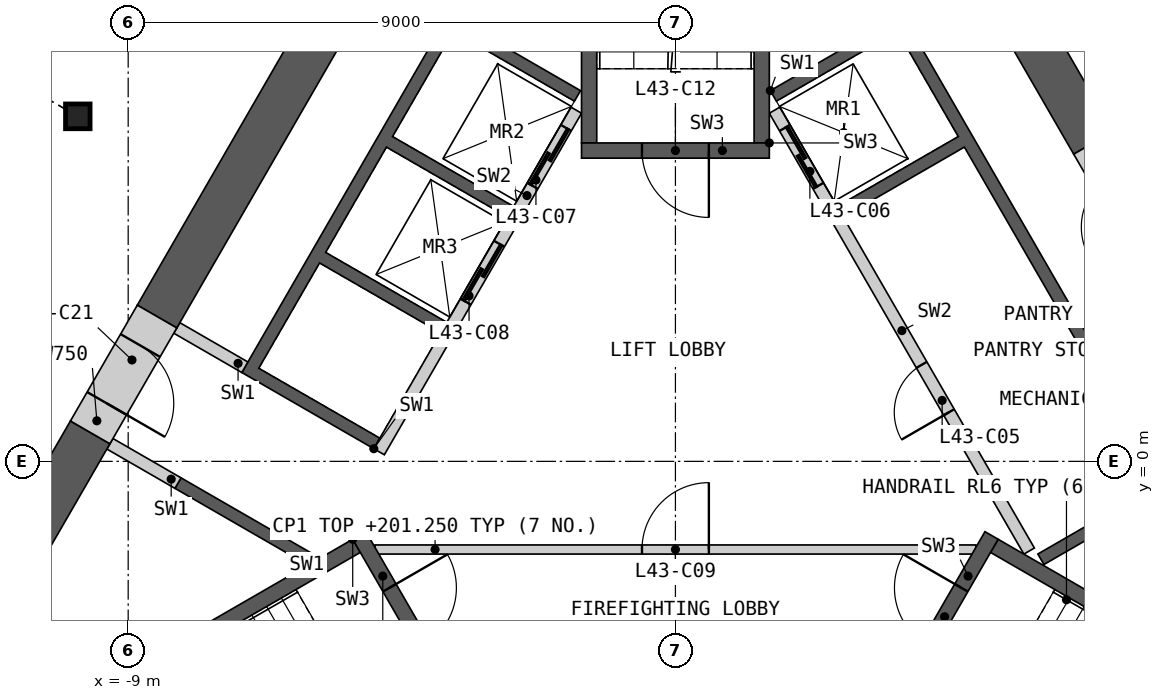
"""IFC4 building model, lengths in metres.
Left out: names, types, materials, properties, quantities, classifications, styles, units other than length and angle.
Written with IfcOpenShell. Run it as: python <this file> out.ifc"""

import sys

from ifc_helpers import new_model, si_unit, direction, frame, frame_2d, origin, origin_2d, place, context, subcontext, project, spatial, polyline, rectangle, i_section, outline, extrude, element, fill, save


model = new_model("IFC4")
c1 = context("Model", 3, precision=1e-05, world=origin(), true_north=direction((0.0, 1.0)))
c2 = subcontext(c1, "Body", "Model", "MODEL_VIEW")
j1 = project(units=[si_unit("LENGTHUNIT", "METRE"), si_unit("PLANEANGLEUNIT", "RADIAN")], contexts=[c1])
p1 = place(None, origin())
s1 = spatial("IfcSite", under=j1, at=p1, CompositionType="ELEMENT")
p2 = place(p1, origin())
s2 = spatial("IfcBuilding", under=s1, at=p2, CompositionType="ELEMENT")
p3 = place(p2, frame((0.0, 0.0, 198.0)))
s3 = spatial("IfcBuildingStorey", under=s2, at=p3, CompositionType="ELEMENT", Elevation=198.0)
p4 = place(p3, frame((-9.828, 5.675, 0.0), z_axis=(0.0, 0.0, 1.0), x_axis=(1.0, 0.0, 0.0)))
e1 = element("IfcColumn", 1, at=p4, inside=s3, PredefinedType="COLUMN", context=c2, shape_type="SweptSolid", body=[
    extrude(i_section(OverallWidth=0.404, OverallDepth=0.407, WebThickness=0.027, FlangeThickness=0.044, at=origin_2d()), origin(), (0.0, 0.0, 1.0), 3.6),
])
p5 = place(p3, origin())
e2 = element("IfcWall", 2, at=p5, inside=s3, PredefinedType="SHEAR", context=c2, shape_type="SweptSolid", body=[
    extrude(outline(polyline([(1.561, 6.097), (3.731, 7.35), (8.231, -0.444), (6.061, -1.697), (5.96, -1.524), (7.952, -0.374), (4.752, 5.169), (2.76, 4.019), (2.66, 4.192), (4.652, 5.342), (3.652, 7.074), (1.66, 5.924), (1.561, 6.097)])), origin(), (0.0, 0.0, 1.0), 3.25),
])
p6 = place(p3, frame((5.817, -1.476, 0.0), z_axis=(0.0, 0.0, 1.0), x_axis=(-0.500002616675, 0.866023893041, 0.0)))
e3 = element("IfcWall", 3, at=p6, inside=s3, PredefinedType="SOLIDWALL", context=c2, shape_type="SweptSolid", body=[
    extrude(rectangle(XDim=8.373, YDim=0.2, at=frame_2d((4.187, 0.0))), origin(), (0.0, 0.0, 1.0), 3.25),
])
p7 = place(p6, frame((2.637, 0.0, 0.0)))
e4 = element("IfcOpeningElement", 4, at=p7, cuts=e3, PredefinedType="OPENING", context=c2, shape_type="SweptSolid", body=[
    extrude(rectangle(XDim=0.9, YDim=2.1, at=frame_2d((0.45, 1.05))), frame((0.0, 0.11, 0.0), z_axis=(0.0, -1.0, 0.0), x_axis=(1.0, 0.0, 0.0)), (0.0, 0.0, 1.0), 0.22),
])
p8 = place(p6, frame((6.937, 0.0, 0.0)))
e5 = element("IfcOpeningElement", 5, at=p8, cuts=e3, PredefinedType="OPENING", context=c2, shape_type="SweptSolid", body=[
    extrude(rectangle(XDim=1.1, YDim=2.1, at=frame_2d((0.55, 1.05))), frame((0.0, 0.11, 0.0), z_axis=(0.0, -1.0, 0.0), x_axis=(1.0, 0.0, 0.0)), (0.0, 0.0, 1.0), 0.22),
])
p9 = place(p3, origin())
e6 = element("IfcWall", 6, at=p9, inside=s3, PredefinedType="SHEAR", context=c2, shape_type="SweptSolid", body=[
    extrude(outline(polyline([(-6.061, -1.697), (-8.231, -0.444), (-8.131, -0.271), (-5.96, -1.524), (-6.061, -1.697)])), origin(), (0.0, 0.0, 1.0), 3.25),
])
p10 = place(p3, origin())
e7 = element("IfcWall", 7, at=p10, inside=s3, PredefinedType="SHEAR", context=c2, shape_type="SweptSolid", body=[
    extrude(outline(polyline([(-4.96, 0.208), (-7.131, 1.461), (-3.731, 7.35), (-1.561, 6.097), (-1.66, 5.924), (-3.652, 7.074), (-4.652, 5.342), (-2.66, 4.192), (-2.76, 4.019), (-4.752, 5.169), (-5.752, 3.437), (-3.76, 2.287), (-3.861, 2.113), (-5.852, 3.263), (-6.852, 1.531), (-4.861, 0.381), (-4.96, 0.208)])), origin(), (0.0, 0.0, 1.0), 3.25),
])
p11 = place(p3, frame((-1.631, 5.776, 0.0), z_axis=(0.0, 0.0, 1.0), x_axis=(-0.499992876559, -0.866029516466, 0.0)))
e8 = element("IfcWall", 8, at=p11, inside=s3, PredefinedType="SOLIDWALL", context=c2, shape_type="SweptSolid", body=[
    extrude(rectangle(XDim=6.486, YDim=0.2, at=frame_2d((3.243, 0.0))), origin(), (0.0, 0.0, 1.0), 3.25),
])
p12 = place(p11, frame((0.337, 0.0, 0.0)))
e9 = element("IfcOpeningElement", 9, at=p12, cuts=e8, PredefinedType="OPENING", context=c2, shape_type="SweptSolid", body=[
    extrude(rectangle(XDim=1.1, YDim=2.1, at=frame_2d((0.55, 1.05))), frame((0.0, 0.11, 0.0), z_axis=(0.0, -1.0, 0.0), x_axis=(1.0, 0.0, 0.0)), (0.0, 0.0, 1.0), 0.22),
])
p13 = place(p11, frame((2.537, 0.0, 0.0)))
e10 = element("IfcOpeningElement", 10, at=p13, cuts=e8, PredefinedType="OPENING", context=c2, shape_type="SweptSolid", body=[
    extrude(rectangle(XDim=1.1, YDim=2.1, at=frame_2d((0.55, 1.05))), frame((0.0, 0.11, 0.0), z_axis=(0.0, -1.0, 0.0), x_axis=(1.0, 0.0, 0.0)), (0.0, 0.0, 1.0), 0.22),
])
for number, where, z_axis, x_axis in (
    (11, (-7.081, 1.548, 0.0), (0.0, 0.0, 1.0), (-0.866, 0.5, 0.0)),
    (12, (-8.181, -0.357, 0.0), (0.0, 0.0, 1.0), (-0.866, 0.5, 0.0)),
):
    element("IfcWall", number, at=place(p3, frame(where, z_axis=z_axis, x_axis=x_axis)), inside=s3, PredefinedType="SHEAR", context=c2, shape_type="SweptSolid", body=[
        extrude(rectangle(XDim=1.293, YDim=0.2, at=frame_2d((0.646, 0.0))), origin(), (0.0, 0.0, 1.0), 3.25),
    ])
p14 = place(p3, frame((-4.941, -1.45, 0.0), z_axis=(0.0, 0.0, 1.0), x_axis=(1.0, 0.0, 0.0)))
e13 = element("IfcWall", 13, at=p14, inside=s3, PredefinedType="PARTITIONING", context=c2, shape_type="SweptSolid", body=[
    extrude(rectangle(XDim=9.882, YDim=0.15, at=frame_2d((4.941, 0.0))), origin(), (0.0, 0.0, 1.0), 3.25),
])
p15 = place(p14, frame((4.391, 0.0, 0.0)))
e14 = element("IfcOpeningElement", 14, at=p15, cuts=e13, PredefinedType="OPENING", context=c2, shape_type="SweptSolid", body=[
    extrude(rectangle(XDim=1.1, YDim=2.1, at=frame_2d((0.55, 1.05))), frame((0.0, 0.085, 0.0), z_axis=(0.0, -1.0, 0.0), x_axis=(1.0, 0.0, 0.0)), (0.0, 0.0, 1.0), 0.17),
])
p16 = place(p3, origin())
e15 = element("IfcWall", 15, at=p16, inside=s3, PredefinedType="SHEAR", context=c2, shape_type="SweptSolid", body=[
    extrude(outline(polyline([(-5.307, -1.281), (-10.374, -4.206), (-10.032, -4.298), (-5.182, -1.498), (-5.307, -1.281)])), origin(), (0.0, 0.0, 1.0), 3.25),
])
p17 = place(p3, frame((-5.199, -1.219, 0.0), z_axis=(0.0, 0.0, 1.0), x_axis=(0.499982516597, -0.866035497597, 0.0)))
e16 = element("IfcWall", 16, at=p17, inside=s3, PredefinedType="SHEAR", context=c2, shape_type="SweptSolid", body=[
    extrude(rectangle(XDim=3.088, YDim=0.25, at=frame_2d((1.544, 0.0))), origin(), (0.0, 0.0, 1.0), 3.25),
])
p18 = place(p17, frame((0.994, 0.0, 0.0)))
e17 = element("IfcOpeningElement", 17, at=p18, cuts=e16, PredefinedType="OPENING", context=c2, shape_type="SweptSolid", body=[
    extrude(rectangle(XDim=1.1, YDim=2.1, at=frame_2d((0.55, 1.05))), frame((0.0, 0.135, 0.0), z_axis=(0.0, -1.0, 0.0), x_axis=(1.0, 0.0, 0.0)), (0.0, 0.0, 1.0), 0.27),
])
p19 = place(p3, origin())
e18 = element("IfcWall", 18, at=p19, inside=s3, PredefinedType="SHEAR", context=c2, shape_type="SweptSolid", body=[
    extrude(outline(polyline([(10.032, -4.298), (10.374, -4.206), (5.307, -1.281), (5.182, -1.498), (10.032, -4.298)])), origin(), (0.0, 0.0, 1.0), 3.25),
])
p20 = place(p3, frame((3.655, -3.893, 0.0), z_axis=(0.0, 0.0, 1.0), x_axis=(0.499982516597, 0.866035497597, 0.0)))
e19 = element("IfcWall", 19, at=p20, inside=s3, PredefinedType="SHEAR", context=c2, shape_type="SweptSolid", body=[
    extrude(rectangle(XDim=3.088, YDim=0.25, at=frame_2d((1.544, 0.0))), origin(), (0.0, 0.0, 1.0), 3.25),
])
p21 = place(p20, frame((0.994, 0.0, 0.0)))
e20 = element("IfcOpeningElement", 20, at=p21, cuts=e19, PredefinedType="OPENING", context=c2, shape_type="SweptSolid", body=[
    extrude(rectangle(XDim=1.1, YDim=2.1, at=frame_2d((0.55, 1.05))), frame((0.0, 0.135, 0.0), z_axis=(0.0, -1.0, 0.0), x_axis=(1.0, 0.0, 0.0)), (0.0, 0.0, 1.0), 0.27),
])
p22 = place(p3, origin())
e21 = element("IfcWall", 21, at=p22, inside=s3, PredefinedType="SHEAR", context=c2, shape_type="SweptSolid", body=[
    extrude(outline(polyline([(1.544, 5.237), (1.544, 11.087), (1.294, 10.837), (1.294, 5.237), (1.544, 5.237)])), origin(), (0.0, 0.0, 1.0), 3.25),
])
p23 = place(p3, origin())
e22 = element("IfcWall", 22, at=p23, inside=s3, PredefinedType="SHEAR", context=c2, shape_type="SweptSolid", body=[
    extrude(outline(polyline([(-1.294, 10.837), (-1.544, 11.087), (-1.544, 5.237), (-1.294, 5.237), (-1.294, 10.837)])), origin(), (0.0, 0.0, 1.0), 3.25),
])
p24 = place(p3, frame((1.544, 5.112, 0.0), z_axis=(0.0, 0.0, 1.0), x_axis=(-1.0, 0.0, 0.0)))
e23 = element("IfcWall", 23, at=p24, inside=s3, PredefinedType="SHEAR", context=c2, shape_type="SweptSolid", body=[
    extrude(rectangle(XDim=3.088, YDim=0.25, at=frame_2d((1.544, 0.0))), origin(), (0.0, 0.0, 1.0), 3.25),
])
p25 = place(p24, frame((0.994, 0.0, 0.0)))
e24 = element("IfcOpeningElement", 24, at=p25, cuts=e23, PredefinedType="OPENING", context=c2, shape_type="SweptSolid", body=[
    extrude(rectangle(XDim=1.1, YDim=2.1, at=frame_2d((0.55, 1.05))), frame((0.0, 0.135, 0.0), z_axis=(0.0, -1.0, 0.0), x_axis=(1.0, 0.0, 0.0)), (0.0, 0.0, 1.0), 0.27),
])
p26 = place(p3, frame((6.875, 5.24, 0.0), z_axis=(0.0, 0.0, 1.0), x_axis=(-0.499997217876, 0.866027010039, 0.0)))
e25 = element("IfcWall", 25, at=p26, inside=s3, PredefinedType="SHEAR", context=c2, shape_type="SweptSolid", body=[
    extrude(rectangle(XDim=13.101, YDim=0.75, at=frame_2d((6.551, 0.0))), origin(), (0.0, 0.0, 1.0), 3.25),
])
p27 = place(p3, frame((-4.95, 8.574, 0.0), z_axis=(0.0, 0.0, 1.0), x_axis=(-0.499987463267, -0.866032641749, 0.0)))
e26 = element("IfcWall", 26, at=p27, inside=s3, PredefinedType="SHEAR", context=c2, shape_type="SweptSolid", body=[
    extrude(rectangle(XDim=7.151, YDim=0.75, at=frame_2d((3.575, 0.0))), origin(), (0.0, 0.0, 1.0), 3.25),
])
p28 = place(p3, frame((-9.625, 0.477, 0.0), z_axis=(0.0, 0.0, 1.0), x_axis=(-0.499951145694, -0.866053607994, 0.0)))
e27 = element("IfcWall", 27, at=p28, inside=s3, PredefinedType="SHEAR", context=c2, shape_type="SweptSolid", body=[
    extrude(rectangle(XDim=3.851, YDim=0.75, at=frame_2d((1.925, 0.0))), origin(), (0.0, 0.0, 1.0), 3.25),
])
p29 = place(p3, frame((7.975, 3.334, 0.0), z_axis=(0.0, 0.0, 1.0), x_axis=(-0.500077893725, 0.86598042715, 0.0)))
e28 = element("IfcWall", 28, at=p29, inside=s3, PredefinedType="SHEAR", context=c2, shape_type="SweptSolid", body=[
    extrude(rectangle(XDim=2.2, YDim=0.75, at=frame_2d((1.1, 0.0))), origin(), (0.0, 0.0, 1.0), 3.25),
])
p30 = place(p29, frame((0.6, 0.0, 0.0)))
e29 = element("IfcOpeningElement", 29, at=p30, cuts=e28, PredefinedType="OPENING", context=c2, shape_type="SweptSolid", body=[
    extrude(rectangle(XDim=1.0, YDim=2.1, at=frame_2d((0.5, 1.05))), frame((0.0, 0.385, 0.0), z_axis=(0.0, -1.0, 0.0), x_axis=(1.0, 0.0, 0.0)), (0.0, 0.0, 1.0), 0.77),
])
p31 = place(p3, frame((-8.525, 2.382, 0.0), z_axis=(0.0, 0.0, 1.0), x_axis=(-0.500077893725, -0.86598042715, 0.0)))
e30 = element("IfcWall", 30, at=p31, inside=s3, PredefinedType="SHEAR", context=c2, shape_type="SweptSolid", body=[
    extrude(rectangle(XDim=2.2, YDim=0.75, at=frame_2d((1.1, 0.0))), origin(), (0.0, 0.0, 1.0), 3.25),
])
p32 = place(p31, frame((0.55, 0.0, 0.0)))
e31 = element("IfcOpeningElement", 31, at=p32, cuts=e30, PredefinedType="OPENING", context=c2, shape_type="SweptSolid", body=[
    extrude(rectangle(XDim=1.1, YDim=2.1, at=frame_2d((0.55, 1.05))), frame((0.0, 0.385, 0.0), z_axis=(0.0, -1.0, 0.0), x_axis=(1.0, 0.0, 0.0)), (0.0, 0.0, 1.0), 0.77),
])
p33 = place(p3, frame((-19.476, -5.035, 0.0), z_axis=(0.0, 0.0, 1.0), x_axis=(0.500000757641, 0.86602496636, 0.0)))
e32 = element("IfcWall", 32, at=p33, inside=s3, PredefinedType="PARTITIONING", context=c2, shape_type="SweptSolid", body=[
    extrude(rectangle(XDim=28.198, YDim=0.2, at=frame_2d((14.099, 0.0))), origin(), (0.0, 0.0, 1.0), 3.25),
])
p34 = place(p33, frame((25.796, 0.0, 0.0)))
e33 = element("IfcOpeningElement", 33, at=p34, cuts=e32, PredefinedType="OPENING", context=c2, shape_type="SweptSolid", body=[
    extrude(rectangle(XDim=0.95, YDim=2.1, at=frame_2d((0.475, 1.05))), frame((0.0, 0.11, 0.0), z_axis=(0.0, -1.0, 0.0), x_axis=(1.0, 0.0, 0.0)), (0.0, 0.0, 1.0), 0.22),
])
p35 = place(p33, frame((14.603, 0.0, 0.0)))
e34 = element("IfcOpeningElement", 34, at=p35, cuts=e32, PredefinedType="OPENING", context=c2, shape_type="SweptSolid", body=[
    extrude(rectangle(XDim=1.1, YDim=2.1, at=frame_2d((0.55, 1.05))), frame((0.0, 0.11, 0.0), z_axis=(0.0, -1.0, 0.0), x_axis=(1.0, 0.0, 0.0)), (0.0, 0.0, 1.0), 0.22),
])
p36 = place(p33, frame((11.993, 0.0, 0.0)))
e35 = element("IfcOpeningElement", 35, at=p36, cuts=e32, PredefinedType="OPENING", context=c2, shape_type="SweptSolid", body=[
    extrude(rectangle(XDim=1.1, YDim=2.1, at=frame_2d((0.55, 1.05))), frame((0.0, 0.11, 0.0), z_axis=(0.0, -1.0, 0.0), x_axis=(1.0, 0.0, 0.0)), (0.0, 0.0, 1.0), 0.22),
])
p37 = place(p33, frame((1.452, 0.0, 0.0)))
e36 = element("IfcOpeningElement", 36, at=p37, cuts=e32, PredefinedType="OPENING", context=c2, shape_type="SweptSolid", body=[
    extrude(rectangle(XDim=0.95, YDim=2.1, at=frame_2d((0.475, 1.05))), frame((0.0, 0.11, 0.0), z_axis=(0.0, -1.0, 0.0), x_axis=(1.0, 0.0, 0.0)), (0.0, 0.0, 1.0), 0.22),
])
p38 = place(p3, frame((5.038, 13.972, 0.0), z_axis=(0.0, 0.0, 1.0), x_axis=(0.50000393355, -0.866023132736, 0.0)))
e37 = element("IfcWall", 37, at=p38, inside=s3, PredefinedType="PARTITIONING", context=c2, shape_type="SweptSolid", body=[
    extrude(rectangle(XDim=9.335, YDim=0.2, at=frame_2d((4.667, 0.0))), origin(), (0.0, 0.0, 1.0), 3.25),
])
p39 = place(p38, frame((5.979, 0.0, 0.0)))
e38 = element("IfcOpeningElement", 38, at=p39, cuts=e37, PredefinedType="OPENING", context=c2, shape_type="SweptSolid", body=[
    extrude(rectangle(XDim=1.8, YDim=2.1, at=frame_2d((0.9, 1.05))), frame((0.0, 0.11, 0.0), z_axis=(0.0, -1.0, 0.0), x_axis=(1.0, 0.0, 0.0)), (0.0, 0.0, 1.0), 0.22),
])
p40 = place(p38, frame((3.163, 0.0, 0.0)))
e39 = element("IfcOpeningElement", 39, at=p40, cuts=e37, PredefinedType="OPENING", context=c2, shape_type="SweptSolid", body=[
    extrude(rectangle(XDim=1.0, YDim=2.1, at=frame_2d((0.5, 1.05))), frame((0.0, 0.11, 0.0), z_axis=(0.0, -1.0, 0.0), x_axis=(1.0, 0.0, 0.0)), (0.0, 0.0, 1.0), 0.22),
])
p41 = place(p7, origin())
e40 = element("IfcDoor", 40, at=p41, inside=s3, OperationType="SINGLE_SWING_LEFT", PredefinedType="DOOR", context=c2, shape_type="SweptSolid", body=[
    extrude(rectangle(XDim=0.9, YDim=2.1, at=frame_2d((0.45, 1.05))), frame((0.0, 0.025, 0.0), z_axis=(0.0, -1.0, 0.0), x_axis=(1.0, 0.0, 0.0)), (0.0, 0.0, 1.0), 0.05),
])
fill(e4, e40)
p42 = place(p8, origin())
e41 = element("IfcDoor", 41, at=p42, inside=s3, OperationType="SLIDING_TO_LEFT", PredefinedType="DOOR", context=c2, shape_type="SweptSolid", body=[
    extrude(rectangle(XDim=1.1, YDim=2.1, at=frame_2d((0.55, 1.05))), frame((0.0, 0.025, 0.0), z_axis=(0.0, -1.0, 0.0), x_axis=(1.0, 0.0, 0.0)), (0.0, 0.0, 1.0), 0.05),
])
fill(e5, e41)
p43 = place(p12, origin())
e42 = element("IfcDoor", 42, at=p43, inside=s3, OperationType="SLIDING_TO_LEFT", PredefinedType="DOOR", context=c2, shape_type="SweptSolid", body=[
    extrude(rectangle(XDim=1.1, YDim=2.1, at=frame_2d((0.55, 1.05))), frame((0.0, 0.025, 0.0), z_axis=(0.0, -1.0, 0.0), x_axis=(1.0, 0.0, 0.0)), (0.0, 0.0, 1.0), 0.05),
])
fill(e9, e42)
p44 = place(p13, origin())
e43 = element("IfcDoor", 43, at=p44, inside=s3, OperationType="SLIDING_TO_LEFT", PredefinedType="DOOR", context=c2, shape_type="SweptSolid", body=[
    extrude(rectangle(XDim=1.1, YDim=2.1, at=frame_2d((0.55, 1.05))), frame((0.0, 0.025, 0.0), z_axis=(0.0, -1.0, 0.0), x_axis=(1.0, 0.0, 0.0)), (0.0, 0.0, 1.0), 0.05),
])
fill(e10, e43)
p45 = place(p15, origin())
e44 = element("IfcDoor", 44, at=p45, inside=s3, OperationType="SINGLE_SWING_RIGHT", PredefinedType="DOOR", context=c2, shape_type="SweptSolid", body=[
    extrude(rectangle(XDim=1.1, YDim=2.1, at=frame_2d((0.55, 1.05))), frame((0.0, 0.025, 0.0), z_axis=(0.0, -1.0, 0.0), x_axis=(1.0, 0.0, 0.0)), (0.0, 0.0, 1.0), 0.05),
])
fill(e14, e44)
p46 = place(p18, origin())
e45 = element("IfcDoor", 45, at=p46, inside=s3, OperationType="SINGLE_SWING_LEFT", PredefinedType="DOOR", context=c2, shape_type="SweptSolid", body=[
    extrude(rectangle(XDim=1.1, YDim=2.1, at=frame_2d((0.55, 1.05))), frame((0.0, 0.025, 0.0), z_axis=(0.0, -1.0, 0.0), x_axis=(1.0, 0.0, 0.0)), (0.0, 0.0, 1.0), 0.05),
])
fill(e17, e45)
p47 = place(p21, origin())
e46 = element("IfcDoor", 46, at=p47, inside=s3, OperationType="SINGLE_SWING_RIGHT", PredefinedType="DOOR", context=c2, shape_type="SweptSolid", body=[
    extrude(rectangle(XDim=1.1, YDim=2.1, at=frame_2d((0.55, 1.05))), frame((0.0, 0.025, 0.0), z_axis=(0.0, -1.0, 0.0), x_axis=(1.0, 0.0, 0.0)), (0.0, 0.0, 1.0), 0.05),
])
fill(e20, e46)
p48 = place(p25, origin())
e47 = element("IfcDoor", 47, at=p48, inside=s3, OperationType="SINGLE_SWING_LEFT", PredefinedType="DOOR", context=c2, shape_type="SweptSolid", body=[
    extrude(rectangle(XDim=1.1, YDim=2.1, at=frame_2d((0.55, 1.05))), frame((0.0, 0.025, 0.0), z_axis=(0.0, -1.0, 0.0), x_axis=(1.0, 0.0, 0.0)), (0.0, 0.0, 1.0), 0.05),
])
fill(e24, e47)
p49 = place(p32, origin())
e48 = element("IfcDoor", 48, at=p49, inside=s3, OperationType="SINGLE_SWING_RIGHT", PredefinedType="DOOR", context=c2, shape_type="SweptSolid", body=[
    extrude(rectangle(XDim=1.1, YDim=2.1, at=frame_2d((0.55, 1.05))), frame((0.0, 0.13, 0.0), z_axis=(0.0, -1.0, 0.0), x_axis=(1.0, 0.0, 0.0)), (0.0, 0.0, 1.0), 0.05),
])
fill(e31, e48)
save(model, sys.argv[1])
